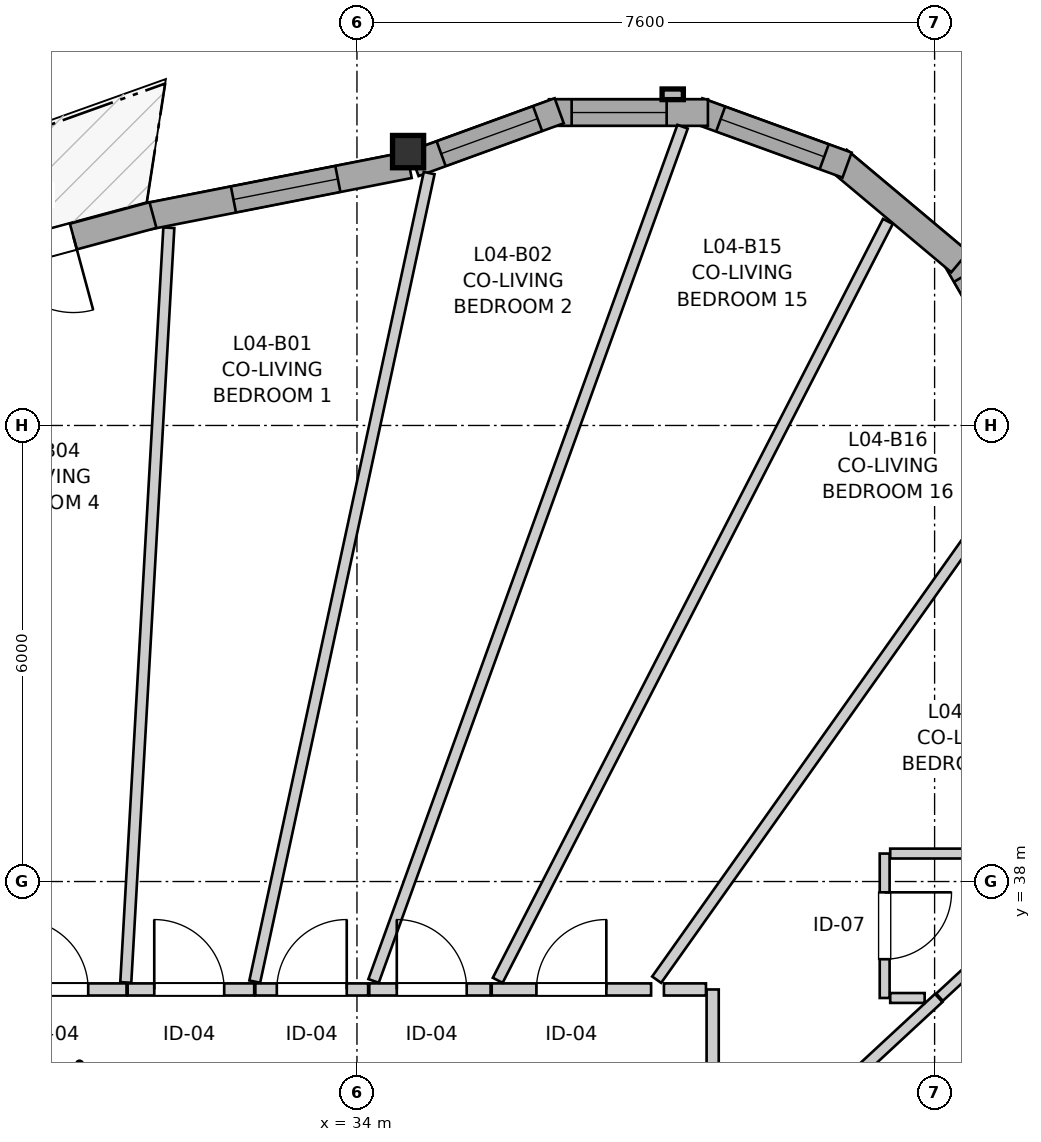
"""IFC4 building model, lengths in metres.
Left out: names, types, materials, properties, quantities, classifications, styles, units other than length and angle.
Written with IfcOpenShell. Run it as: python <this file> out.ifc"""

import sys

from ifc_helpers import new_model, si_unit, direction, frame, frame_2d, origin, origin_2d, place, context, subcontext, project, spatial, rectangle, i_section, extrude, source, transform, mapped, element, fill, save


model = new_model("IFC4")
c1 = context("Model", 3, precision=1e-05, world=origin(), true_north=direction((0.0, 1.0)))
c2 = subcontext(c1, "Body", "Model", "MODEL_VIEW")
j1 = project(units=[si_unit("LENGTHUNIT", "METRE"), si_unit("PLANEANGLEUNIT", "RADIAN")], contexts=[c1])
p1 = place(None, origin())
s1 = spatial("IfcSite", under=j1, at=p1, CompositionType="ELEMENT")
p2 = place(p1, origin())
s2 = spatial("IfcBuilding", under=s1, at=p2, CompositionType="ELEMENT")
p3 = place(p2, frame((0.0, 0.0, 17.4)))
s3 = spatial("IfcBuildingStorey", under=s2, at=p3, CompositionType="ELEMENT", Elevation=17.4)
m1 = source(origin(), c2, "Body", "SweptSolid", [
    extrude(i_section(OverallWidth=0.409, OverallDepth=0.425, WebThickness=0.03, FlangeThickness=0.048, FilletRadius=0.015, at=origin_2d()), origin(), (0.0, 0.0, 1.0), 2.94),
])
p4 = place(p3, frame((34.673, 47.603, 0.0), z_axis=(0.0, 0.0, 1.0), x_axis=(1.0, 0.0, 0.0)))
e1 = element("IfcColumn", 1, at=p4, inside=s3, PredefinedType="PILASTER", context=c2, shape_type="MappedRepresentation", body=[
    mapped(m1, transform((0.0, 0.0, 0.0), x_axis=(1.0, 0.0, 0.0), y_axis=(0.0, 1.0, 0.0), z_axis=(0.0, 0.0, 1.0), scale=1.0)),
])
p5 = place(p3, frame((42.89, 44.443, 0.0), z_axis=(0.0, 0.0, 1.0), x_axis=(-0.499995423472, 0.866028046028, 0.0)))
e2 = element("IfcWall", 2, at=p5, inside=s3, PredefinedType="SOLIDWALL", context=c2, shape_type="SweptSolid", body=[
    extrude(rectangle(XDim=2.09, YDim=0.35, at=frame_2d((1.045, 0.0))), origin(), (0.0, 0.0, 1.0), 2.42),
])
p6 = place(p5, frame((0.32, 0.0, 0.82)))
e3 = element("IfcOpeningElement", 3, at=p6, cuts=e2, PredefinedType="OPENING", context=c2, shape_type="SweptSolid", body=[
    extrude(rectangle(XDim=1.45, YDim=1.25, at=frame_2d((0.725, 0.625))), frame((0.0, 0.185, 0.0), z_axis=(0.0, -1.0, 0.0), x_axis=(1.0, 0.0, 0.0)), (0.0, 0.0, 1.0), 0.37),
])
p7 = place(p3, frame((41.932, 46.15, 0.0), z_axis=(0.0, 0.0, 1.0), x_axis=(-0.766024572719, 0.642811289563, 0.0)))
e4 = element("IfcWall", 4, at=p7, inside=s3, PredefinedType="SOLIDWALL", context=c2, shape_type="SweptSolid", body=[
    extrude(rectangle(XDim=2.09, YDim=0.35, at=frame_2d((1.045, 0.0))), origin(), (0.0, 0.0, 1.0), 2.42),
])
p8 = place(p3, frame((40.448, 47.426, 0.0), z_axis=(0.0, 0.0, 1.0), x_axis=(-0.939711556618, 0.341968113072, 0.0)))
e5 = element("IfcWall", 5, at=p8, inside=s3, PredefinedType="SOLIDWALL", context=c2, shape_type="SweptSolid", body=[
    extrude(rectangle(XDim=2.09, YDim=0.35, at=frame_2d((1.045, 0.0))), origin(), (0.0, 0.0, 1.0), 2.42),
])
p9 = place(p8, frame((0.32, 0.0, 0.82)))
e6 = element("IfcOpeningElement", 6, at=p9, cuts=e5, PredefinedType="OPENING", context=c2, shape_type="SweptSolid", body=[
    extrude(rectangle(XDim=1.45, YDim=1.25, at=frame_2d((0.725, 0.625))), frame((0.0, 0.185, 0.0), z_axis=(0.0, -1.0, 0.0), x_axis=(1.0, 0.0, 0.0)), (0.0, 0.0, 1.0), 0.37),
])
p10 = place(p3, frame((38.618, 48.117, 0.0), z_axis=(0.0, 0.0, 1.0), x_axis=(-1.0, 0.0, 0.0)))
e7 = element("IfcWall", 7, at=p10, inside=s3, PredefinedType="SOLIDWALL", context=c2, shape_type="SweptSolid", body=[
    extrude(rectangle(XDim=2.09, YDim=0.35, at=frame_2d((1.045, 0.0))), origin(), (0.0, 0.0, 1.0), 2.42),
])
p11 = place(p10, frame((0.543, 0.0, 0.82)))
e8 = element("IfcOpeningElement", 8, at=p11, cuts=e7, PredefinedType="OPENING", context=c2, shape_type="SweptSolid", body=[
    extrude(rectangle(XDim=1.25, YDim=1.35, at=frame_2d((0.625, 0.675))), frame((0.0, 0.185, 0.0), z_axis=(0.0, -1.0, 0.0), x_axis=(1.0, 0.0, 0.0)), (0.0, 0.0, 1.0), 0.37),
])
p12 = place(p3, frame((36.661, 48.14, 0.0), z_axis=(0.0, 0.0, 1.0), x_axis=(-0.939691662178, -0.342022777067, 0.0)))
e9 = element("IfcWall", 9, at=p12, inside=s3, PredefinedType="SOLIDWALL", context=c2, shape_type="SweptSolid", body=[
    extrude(rectangle(XDim=2.032, YDim=0.35, at=frame_2d((1.016, 0.0))), origin(), (0.0, 0.0, 1.0), 2.42),
])
p13 = place(p12, frame((0.302, 0.0, 0.82)))
e10 = element("IfcOpeningElement", 10, at=p13, cuts=e9, PredefinedType="OPENING", context=c2, shape_type="SweptSolid", body=[
    extrude(rectangle(XDim=1.35, YDim=1.45, at=frame_2d((0.675, 0.725))), frame((0.0, 0.185, 0.0), z_axis=(0.0, -1.0, 0.0), x_axis=(1.0, 0.0, 0.0)), (0.0, 0.0, 1.0), 0.37),
])
p14 = place(p3, frame((34.687, 47.427, 0.0), z_axis=(0.0, 0.0, 1.0), x_axis=(-0.981220485855, -0.192889497219, 0.0)))
e11 = element("IfcWall", 11, at=p14, inside=s3, PredefinedType="SOLIDWALL", context=c2, shape_type="SweptSolid", body=[
    extrude(rectangle(XDim=3.522, YDim=0.35, at=frame_2d((1.761, 0.0))), origin(), (0.0, 0.0, 1.0), 2.42),
])
p15 = place(p14, frame((0.956, 0.0, 0.82)))
e12 = element("IfcOpeningElement", 12, at=p15, cuts=e11, PredefinedType="OPENING", context=c2, shape_type="SweptSolid", body=[
    extrude(rectangle(XDim=1.4, YDim=1.35, at=frame_2d((0.7, 0.675))), frame((0.0, 0.185, 0.0), z_axis=(0.0, -1.0, 0.0), x_axis=(1.0, 0.0, 0.0)), (0.0, 0.0, 1.0), 0.37),
])
p16 = place(p3, frame((31.316, 46.768, 0.0), z_axis=(0.0, 0.0, 1.0), x_axis=(-0.965446721184, -0.260600515261, 0.0)))
e13 = element("IfcWall", 13, at=p16, inside=s3, PredefinedType="SOLIDWALL", context=c2, shape_type="SweptSolid", body=[
    extrude(rectangle(XDim=3.169, YDim=0.35, at=frame_2d((1.585, 0.0))), origin(), (0.0, 0.0, 1.0), 2.42),
])
p17 = place(p16, frame((1.085, 0.0, 0.0)))
e14 = element("IfcOpeningElement", 14, at=p17, cuts=e13, PredefinedType="OPENING", context=c2, shape_type="SweptSolid", body=[
    extrude(rectangle(XDim=1.0, YDim=2.1, at=frame_2d((0.5, 1.05))), frame((0.0, 0.185, 0.0), z_axis=(0.0, -1.0, 0.0), x_axis=(1.0, 0.0, 0.0)), (0.0, 0.0, 1.0), 0.37),
])
p18 = place(p3, frame((38.68, 36.58, 0.0), z_axis=(0.0, 0.0, 1.0), x_axis=(0.0, -1.0, 0.0)))
e15 = element("IfcWall", 15, at=p18, inside=s3, PredefinedType="PARTITIONING", context=c2, shape_type="SweptSolid", body=[
    extrude(rectangle(XDim=2.83, YDim=0.16, at=frame_2d((1.415, 0.0))), origin(), (0.0, 0.0, 1.0), 2.94),
])
p19 = place(p18, frame((0.973, 0.0, 0.0)))
e16 = element("IfcOpeningElement", 16, at=p19, cuts=e15, PredefinedType="OPENING", context=c2, shape_type="SweptSolid", body=[
    extrude(rectangle(XDim=0.92, YDim=2.1, at=frame_2d((0.46, 1.05))), frame((0.0, 0.09, 0.0), z_axis=(0.0, -1.0, 0.0), x_axis=(1.0, 0.0, 0.0)), (0.0, 0.0, 1.0), 0.18),
])
p20 = place(p3, frame((35.773, 36.58, 0.0), z_axis=(0.0, 0.0, 1.0), x_axis=(1.0, 0.0, 0.0)))
e17 = element("IfcWall", 17, at=p20, inside=s3, PredefinedType="PARTITIONING", context=c2, shape_type="SweptSolid", body=[
    extrude(rectangle(XDim=2.097, YDim=0.16, at=frame_2d((1.049, 0.0))), origin(), (0.0, 0.0, 1.0), 2.94),
])
p21 = place(p20, frame((0.588, 0.0, 0.0)))
e18 = element("IfcOpeningElement", 18, at=p21, cuts=e17, PredefinedType="OPENING", context=c2, shape_type="SweptSolid", body=[
    extrude(rectangle(XDim=0.92, YDim=2.1, at=frame_2d((0.46, 1.05))), frame((0.0, 0.09, 0.0), z_axis=(0.0, -1.0, 0.0), x_axis=(1.0, 0.0, 0.0)), (0.0, 0.0, 1.0), 0.18),
])
p22 = place(p3, frame((40.943, 38.368, 0.0), z_axis=(0.0, 0.0, 1.0), x_axis=(0.0, -1.0, 0.0)))
e19 = element("IfcWall", 19, at=p22, inside=s3, PredefinedType="PARTITIONING", context=c2, shape_type="SweptSolid", body=[
    extrude(rectangle(XDim=1.9, YDim=0.13, at=frame_2d((0.95, 0.0))), origin(), (0.0, 0.0, 1.0), 2.94),
])
p23 = place(p22, frame((0.51, 0.0, 0.0)))
e20 = element("IfcOpeningElement", 20, at=p23, cuts=e19, PredefinedType="OPENING", context=c2, shape_type="SweptSolid", body=[
    extrude(rectangle(XDim=0.88, YDim=2.05, at=frame_2d((0.44, 1.025))), frame((0.0, 0.075, 0.0), z_axis=(0.0, -1.0, 0.0), x_axis=(1.0, 0.0, 0.0)), (0.0, 0.0, 1.0), 0.15),
])
p24 = place(p3, frame((29.086, 36.58, 0.0), z_axis=(0.0, 0.0, 1.0), x_axis=(1.0, 0.0, 0.0)))
e21 = element("IfcWall", 21, at=p24, inside=s3, PredefinedType="PARTITIONING", context=c2, shape_type="SweptSolid", body=[
    extrude(rectangle(XDim=1.882, YDim=0.16, at=frame_2d((0.941, 0.0))), origin(), (0.0, 0.0, 1.0), 2.94),
])
p25 = place(p24, frame((0.458, 0.0, 0.0)))
e22 = element("IfcOpeningElement", 22, at=p25, cuts=e21, PredefinedType="OPENING", context=c2, shape_type="SweptSolid", body=[
    extrude(rectangle(XDim=0.92, YDim=2.1, at=frame_2d((0.46, 1.05))), frame((0.0, 0.09, 0.0), z_axis=(0.0, -1.0, 0.0), x_axis=(1.0, 0.0, 0.0)), (0.0, 0.0, 1.0), 0.18),
])
p26 = place(p3, frame((30.983, 36.58, 0.0), z_axis=(0.0, 0.0, 1.0), x_axis=(1.0, 0.0, 0.0)))
e23 = element("IfcWall", 23, at=p26, inside=s3, PredefinedType="PARTITIONING", context=c2, shape_type="SweptSolid", body=[
    extrude(rectangle(XDim=1.665, YDim=0.16, at=frame_2d((0.833, 0.0))), origin(), (0.0, 0.0, 1.0), 2.94),
])
p27 = place(p26, frame((0.35, 0.0, 0.0)))
e24 = element("IfcOpeningElement", 24, at=p27, cuts=e23, PredefinedType="OPENING", context=c2, shape_type="SweptSolid", body=[
    extrude(rectangle(XDim=0.92, YDim=2.1, at=frame_2d((0.46, 1.05))), frame((0.0, 0.09, 0.0), z_axis=(0.0, -1.0, 0.0), x_axis=(1.0, 0.0, 0.0)), (0.0, 0.0, 1.0), 0.18),
])
p28 = place(p3, frame((34.162, 36.58, 0.0), z_axis=(0.0, 0.0, 1.0), x_axis=(1.0, 0.0, 0.0)))
e25 = element("IfcWall", 25, at=p28, inside=s3, PredefinedType="PARTITIONING", context=c2, shape_type="SweptSolid", body=[
    extrude(rectangle(XDim=1.596, YDim=0.16, at=frame_2d((0.798, 0.0))), origin(), (0.0, 0.0, 1.0), 2.94),
])
p29 = place(p28, frame((0.362, 0.0, 0.0)))
e26 = element("IfcOpeningElement", 26, at=p29, cuts=e25, PredefinedType="OPENING", context=c2, shape_type="SweptSolid", body=[
    extrude(rectangle(XDim=0.92, YDim=2.1, at=frame_2d((0.46, 1.05))), frame((0.0, 0.09, 0.0), z_axis=(0.0, -1.0, 0.0), x_axis=(1.0, 0.0, 0.0)), (0.0, 0.0, 1.0), 0.18),
])
p30 = place(p3, frame((32.663, 36.58, 0.0), z_axis=(0.0, 0.0, 1.0), x_axis=(1.0, 0.0, 0.0)))
e27 = element("IfcWall", 27, at=p30, inside=s3, PredefinedType="PARTITIONING", context=c2, shape_type="SweptSolid", body=[
    extrude(rectangle(XDim=1.484, YDim=0.16, at=frame_2d((0.742, 0.0))), origin(), (0.0, 0.0, 1.0), 2.94),
])
p31 = place(p30, frame((0.282, 0.0, 0.0)))
e28 = element("IfcOpeningElement", 28, at=p31, cuts=e27, PredefinedType="OPENING", context=c2, shape_type="SweptSolid", body=[
    extrude(rectangle(XDim=0.92, YDim=2.1, at=frame_2d((0.46, 1.05))), frame((0.0, 0.09, 0.0), z_axis=(0.0, -1.0, 0.0), x_axis=(1.0, 0.0, 0.0)), (0.0, 0.0, 1.0), 0.18),
])
p32 = place(p3, frame((34.219, 36.692, 0.0), z_axis=(0.0, 0.0, 1.0), x_axis=(0.340186046968, 0.940358151689, 0.0)))
e29 = element("IfcWall", 29, at=p32, inside=s3, PredefinedType="PARTITIONING", context=c2, shape_type="SweptSolid", body=[
    extrude(rectangle(XDim=11.951, YDim=0.145, at=frame_2d((5.976, 0.0))), origin(), (0.0, 0.0, 1.0), 2.94),
])
p33 = place(p3, frame((35.852, 36.7, 0.0), z_axis=(0.0, 0.0, 1.0), x_axis=(0.457258091214, 0.889334041865, 0.0)))
e30 = element("IfcWall", 30, at=p33, inside=s3, PredefinedType="PARTITIONING", context=c2, shape_type="SweptSolid", body=[
    extrude(rectangle(XDim=11.227, YDim=0.145, at=frame_2d((5.613, 0.0))), origin(), (0.0, 0.0, 1.0), 2.94),
])
p34 = place(p3, frame((32.655, 36.683, 0.0), z_axis=(0.0, 0.0, 1.0), x_axis=(0.210861831441, 0.977515876107, 0.0)))
e31 = element("IfcWall", 31, at=p34, inside=s3, PredefinedType="PARTITIONING", context=c2, shape_type="SweptSolid", body=[
    extrude(rectangle(XDim=10.882, YDim=0.145, at=frame_2d((5.441, 0.0))), origin(), (0.0, 0.0, 1.0), 2.94),
])
p35 = place(p3, frame((30.958, 36.672, 0.0), z_axis=(0.0, 0.0, 1.0), x_axis=(0.056976385457, 0.998375526293, 0.0)))
e32 = element("IfcWall", 32, at=p35, inside=s3, PredefinedType="PARTITIONING", context=c2, shape_type="SweptSolid", body=[
    extrude(rectangle(XDim=9.945, YDim=0.145, at=frame_2d((4.973, 0.0))), origin(), (0.0, 0.0, 1.0), 2.94),
])
p36 = place(p3, frame((37.943, 36.708, 0.0), z_axis=(0.0, 0.0, 1.0), x_axis=(0.578429476704, 0.81573239514, 0.0)))
e33 = element("IfcWall", 33, at=p36, inside=s3, PredefinedType="PARTITIONING", context=c2, shape_type="SweptSolid", body=[
    extrude(rectangle(XDim=8.447, YDim=0.145, at=frame_2d((4.223, 0.0))), origin(), (0.0, 0.0, 1.0), 2.94),
])
p37 = place(p3, frame((38.815, 33.839, 0.0), z_axis=(0.0, 0.0, 1.0), x_axis=(0.733718730688, 0.67945332749, 0.0)))
e34 = element("IfcWall", 34, at=p37, inside=s3, PredefinedType="PARTITIONING", context=c2, shape_type="SweptSolid", body=[
    extrude(rectangle(XDim=3.869, YDim=0.145, at=frame_2d((1.935, 0.0))), origin(), (0.0, 0.0, 1.0), 2.94),
])
p38 = place(p3, frame((41.016, 38.368, 0.0), z_axis=(0.0, 0.0, 1.0), x_axis=(1.0, 0.0, 0.0)))
e35 = element("IfcWall", 35, at=p38, inside=s3, PredefinedType="PARTITIONING", context=c2, shape_type="SweptSolid", body=[
    extrude(rectangle(XDim=1.727, YDim=0.13, at=frame_2d((0.863, 0.0))), origin(), (0.0, 0.0, 1.0), 2.94),
])
p39 = place(p3, frame((41.665, 36.478, 0.0), z_axis=(0.0, 0.0, 1.0), x_axis=(0.733534386117, 0.679652340821, 0.0)))
e36 = element("IfcWall", 36, at=p39, inside=s3, PredefinedType="PARTITIONING", context=c2, shape_type="SweptSolid", body=[
    extrude(rectangle(XDim=1.454, YDim=0.13, at=frame_2d((0.727, 0.0))), origin(), (0.0, 0.0, 1.0), 2.94),
])
p40 = place(p3, frame((38.039, 36.58, 0.0), z_axis=(0.0, 0.0, 1.0), x_axis=(1.0, 0.0, 0.0)))
e37 = element("IfcWall", 37, at=p40, inside=s3, PredefinedType="PARTITIONING", context=c2, shape_type="SweptSolid", body=[
    extrude(rectangle(XDim=0.553, YDim=0.16, at=frame_2d((0.277, 0.0))), origin(), (0.0, 0.0, 1.0), 2.94),
])
p41 = place(p3, frame((41.016, 36.468, 0.0), z_axis=(0.0, 0.0, 1.0), x_axis=(1.0, 0.0, 0.0)))
e38 = element("IfcWall", 38, at=p41, inside=s3, PredefinedType="PARTITIONING", context=c2, shape_type="SweptSolid", body=[
    extrude(rectangle(XDim=0.453, YDim=0.13, at=frame_2d((0.227, 0.0))), origin(), (0.0, 0.0, 1.0), 2.94),
])
m2 = source(origin(), c2, "Body", "SweptSolid", [
    extrude(rectangle(XDim=1.45, YDim=1.25, at=frame_2d((0.725, 0.625))), frame((0.0, 0.03, 0.0), z_axis=(0.0, -1.0, 0.0), x_axis=(1.0, 0.0, 0.0)), (0.0, 0.0, 1.0), 0.06),
])
p42 = place(p9, origin())
e39 = element("IfcWindow", 39, at=p42, inside=s3, PartitioningType="SINGLE_PANEL", PredefinedType="WINDOW", context=c2, shape_type="MappedRepresentation", body=[
    mapped(m2, transform((0.0, 0.0, 0.0), x_axis=(1.0, 0.0, 0.0), y_axis=(0.0, 1.0, 0.0), z_axis=(0.0, 0.0, 1.0), scale=1.0)),
])
fill(e6, e39)
m3 = source(origin(), c2, "Body", "SweptSolid", [
    extrude(rectangle(XDim=1.25, YDim=1.35, at=frame_2d((0.625, 0.675))), frame((0.0, 0.03, 0.0), z_axis=(0.0, -1.0, 0.0), x_axis=(1.0, 0.0, 0.0)), (0.0, 0.0, 1.0), 0.06),
])
p43 = place(p11, origin())
e40 = element("IfcWindow", 40, at=p43, inside=s3, PartitioningType="SINGLE_PANEL", PredefinedType="WINDOW", context=c2, shape_type="MappedRepresentation", body=[
    mapped(m3, transform((0.0, 0.0, 0.0), x_axis=(1.0, 0.0, 0.0), y_axis=(0.0, 1.0, 0.0), z_axis=(0.0, 0.0, 1.0), scale=1.0)),
])
fill(e8, e40)
m4 = source(origin(), c2, "Body", "SweptSolid", [
    extrude(rectangle(XDim=1.35, YDim=1.45, at=frame_2d((0.675, 0.725))), frame((0.0, 0.03, 0.0), z_axis=(0.0, -1.0, 0.0), x_axis=(1.0, 0.0, 0.0)), (0.0, 0.0, 1.0), 0.06),
])
p44 = place(p13, origin())
e41 = element("IfcWindow", 41, at=p44, inside=s3, PartitioningType="SINGLE_PANEL", PredefinedType="WINDOW", context=c2, shape_type="MappedRepresentation", body=[
    mapped(m4, transform((0.0, 0.0, 0.0), x_axis=(1.0, 0.0, 0.0), y_axis=(0.0, 1.0, 0.0), z_axis=(0.0, 0.0, 1.0), scale=1.0)),
])
fill(e10, e41)
m5 = source(origin(), c2, "Body", "SweptSolid", [
    extrude(rectangle(XDim=1.4, YDim=1.35, at=frame_2d((0.7, 0.675))), frame((0.0, 0.03, 0.0), z_axis=(0.0, -1.0, 0.0), x_axis=(1.0, 0.0, 0.0)), (0.0, 0.0, 1.0), 0.06),
])
p45 = place(p15, origin())
e42 = element("IfcWindow", 42, at=p45, inside=s3, PartitioningType="SINGLE_PANEL", PredefinedType="WINDOW", context=c2, shape_type="MappedRepresentation", body=[
    mapped(m5, transform((0.0, 0.0, 0.0), x_axis=(1.0, 0.0, 0.0), y_axis=(0.0, 1.0, 0.0), z_axis=(0.0, 0.0, 1.0), scale=1.0)),
])
fill(e12, e42)
m6 = source(origin(), c2, "Body", "SweptSolid", [
    extrude(rectangle(XDim=1.0, YDim=2.1, at=frame_2d((0.5, 1.05))), frame((0.0, 0.025, 0.0), z_axis=(0.0, -1.0, 0.0), x_axis=(1.0, 0.0, 0.0)), (0.0, 0.0, 1.0), 0.05),
])
p46 = place(p17, origin())
e43 = element("IfcDoor", 43, at=p46, inside=s3, OperationType="SINGLE_SWING_LEFT", PredefinedType="DOOR", context=c2, shape_type="MappedRepresentation", body=[
    mapped(m6, transform((0.0, 0.0, 0.0), x_axis=(1.0, 0.0, 0.0), y_axis=(0.0, 1.0, 0.0), z_axis=(0.0, 0.0, 1.0), scale=1.0)),
])
fill(e14, e43)
m7 = source(origin(), c2, "Body", "SweptSolid", [
    extrude(rectangle(XDim=0.92, YDim=2.1, at=frame_2d((0.46, 1.05))), frame((0.0, 0.025, 0.0), z_axis=(0.0, -1.0, 0.0), x_axis=(1.0, 0.0, 0.0)), (0.0, 0.0, 1.0), 0.05),
])
p47 = place(p21, origin())
e44 = element("IfcDoor", 44, at=p47, inside=s3, OperationType="SINGLE_SWING_RIGHT", PredefinedType="DOOR", context=c2, shape_type="MappedRepresentation", body=[
    mapped(m7, transform((0.0, 0.0, 0.0), x_axis=(1.0, 0.0, 0.0), y_axis=(0.0, 1.0, 0.0), z_axis=(0.0, 0.0, 1.0), scale=1.0)),
])
fill(e18, e44)
m8 = source(origin(), c2, "Body", "SweptSolid", [
    extrude(rectangle(XDim=0.88, YDim=2.05, at=frame_2d((0.44, 1.025))), frame((0.0, 0.025, 0.0), z_axis=(0.0, -1.0, 0.0), x_axis=(1.0, 0.0, 0.0)), (0.0, 0.0, 1.0), 0.05),
])
p48 = place(p23, origin())
e45 = element("IfcDoor", 45, at=p48, inside=s3, OperationType="SINGLE_SWING_LEFT", PredefinedType="DOOR", context=c2, shape_type="MappedRepresentation", body=[
    mapped(m8, transform((0.0, 0.0, 0.0), x_axis=(1.0, 0.0, 0.0), y_axis=(0.0, 1.0, 0.0), z_axis=(0.0, 0.0, 1.0), scale=1.0)),
])
fill(e20, e45)
p49 = place(p25, origin())
e46 = element("IfcDoor", 46, at=p49, inside=s3, OperationType="SINGLE_SWING_LEFT", PredefinedType="DOOR", context=c2, shape_type="MappedRepresentation", body=[
    mapped(m7, transform((0.0, 0.0, 0.0), x_axis=(1.0, 0.0, 0.0), y_axis=(0.0, 1.0, 0.0), z_axis=(0.0, 0.0, 1.0), scale=1.0)),
])
fill(e22, e46)
p50 = place(p27, origin())
e47 = element("IfcDoor", 47, at=p50, inside=s3, OperationType="SINGLE_SWING_LEFT", PredefinedType="DOOR", context=c2, shape_type="MappedRepresentation", body=[
    mapped(m7, transform((0.0, 0.0, 0.0), x_axis=(1.0, 0.0, 0.0), y_axis=(0.0, 1.0, 0.0), z_axis=(0.0, 0.0, 1.0), scale=1.0)),
])
fill(e24, e47)
p51 = place(p29, origin())
e48 = element("IfcDoor", 48, at=p51, inside=s3, OperationType="SINGLE_SWING_LEFT", PredefinedType="DOOR", context=c2, shape_type="MappedRepresentation", body=[
    mapped(m7, transform((0.0, 0.0, 0.0), x_axis=(1.0, 0.0, 0.0), y_axis=(0.0, 1.0, 0.0), z_axis=(0.0, 0.0, 1.0), scale=1.0)),
])
fill(e26, e48)
p52 = place(p31, origin())
e49 = element("IfcDoor", 49, at=p52, inside=s3, OperationType="SINGLE_SWING_RIGHT", PredefinedType="DOOR", context=c2, shape_type="MappedRepresentation", body=[
    mapped(m7, transform((0.0, 0.0, 0.0), x_axis=(1.0, 0.0, 0.0), y_axis=(0.0, 1.0, 0.0), z_axis=(0.0, 0.0, 1.0), scale=1.0)),
])
fill(e28, e49)
save(model, sys.argv[1])
